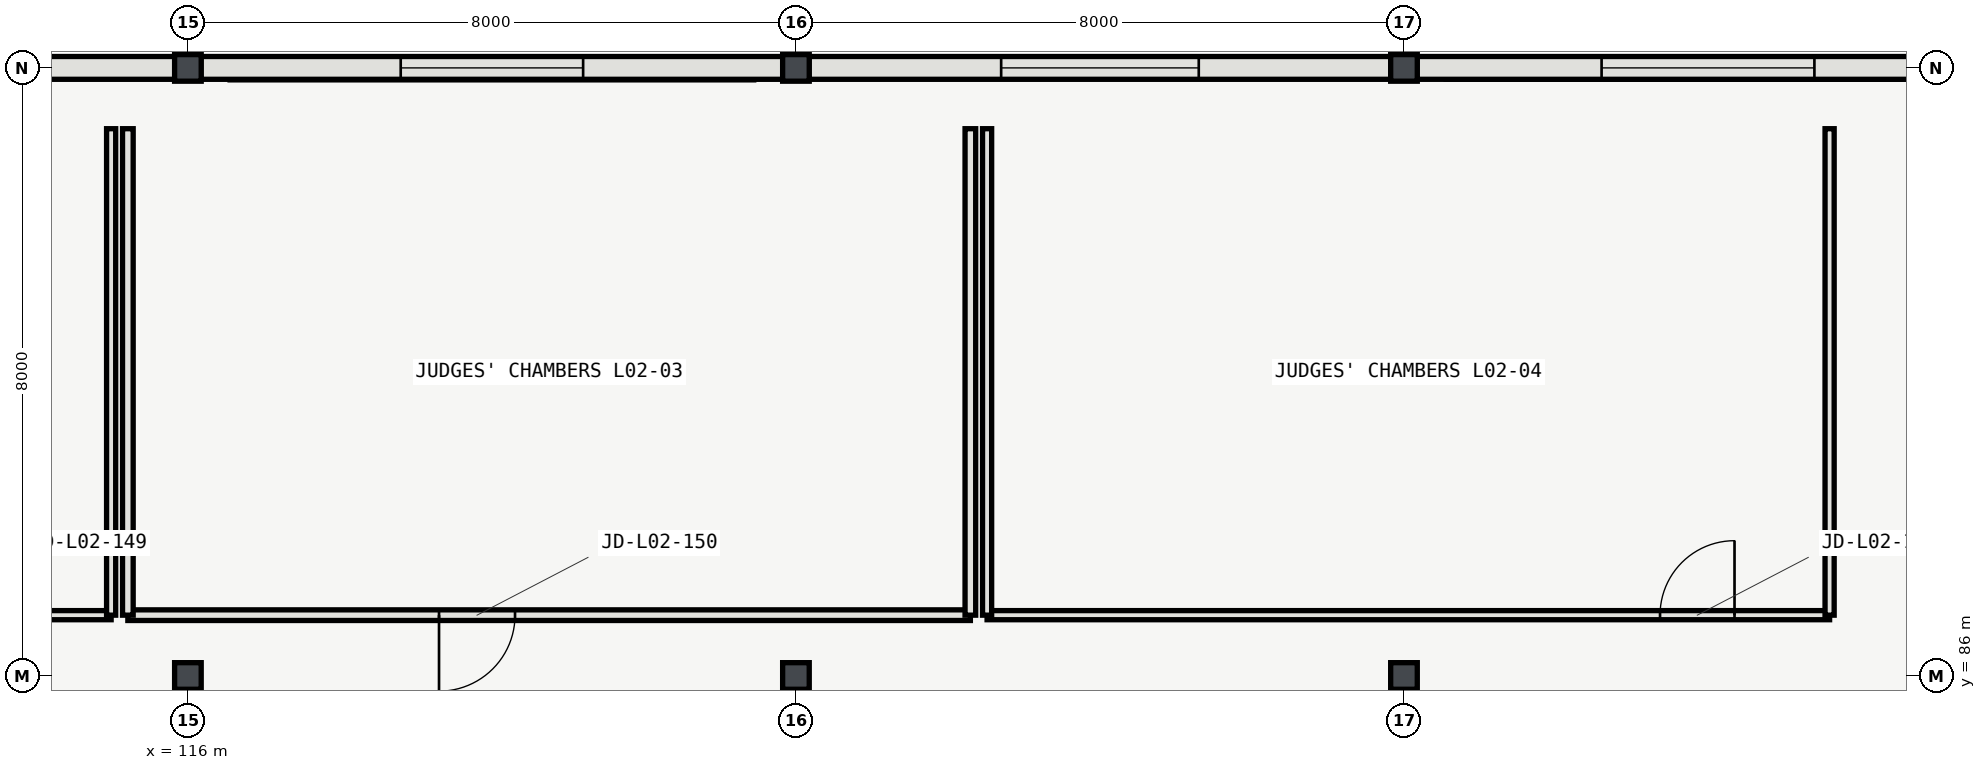
"""IFC4 building model, lengths in metres.
Left out: names, types, materials, properties, quantities, classifications, styles, units other than length and angle.
Written with IfcOpenShell. Run it as: python <this file> out.ifc"""

import sys

from ifc_helpers import new_model, si_unit, direction, frame, frame_2d, origin, origin_2d, place, context, subcontext, project, spatial, rectangle, i_section, extrude, element, fill, save


model = new_model("IFC4")
c1 = context("Model", 3, precision=1e-05, world=origin(), true_north=direction((0.0, 1.0)))
c2 = subcontext(c1, "Body", "Model", "MODEL_VIEW")
j1 = project(units=[si_unit("LENGTHUNIT", "METRE"), si_unit("PLANEANGLEUNIT", "RADIAN")], contexts=[c1])
p1 = place(None, origin())
s1 = spatial("IfcSite", under=j1, at=p1, CompositionType="ELEMENT")
p2 = place(p1, origin())
s2 = spatial("IfcBuilding", under=s1, at=p2, CompositionType="ELEMENT")
p3 = place(p2, frame((0.0, 0.0, 10.8)))
s3 = spatial("IfcBuildingStorey", under=s2, at=p3, CompositionType="ELEMENT", Elevation=10.8)
for number, where, z_axis, x_axis in (
    (1, (116.0, 86.0, 0.0), (0.0, 0.0, 1.0), (1.0, 0.0, 0.0)),
    (2, (116.0, 94.0, 0.0), (0.0, 0.0, 1.0), (1.0, 0.0, 0.0)),
    (3, (124.0, 86.0, 0.0), (0.0, 0.0, 1.0), (1.0, 0.0, 0.0)),
    (4, (124.0, 94.0, 0.0), (0.0, 0.0, 1.0), (1.0, 0.0, 0.0)),
    (5, (132.0, 86.0, 0.0), (0.0, 0.0, 1.0), (1.0, 0.0, 0.0)),
    (6, (132.0, 94.0, 0.0), (0.0, 0.0, 1.0), (1.0, 0.0, 0.0)),
):
    element("IfcColumn", number, at=place(p3, frame(where, z_axis=z_axis, x_axis=x_axis)), inside=s3, PredefinedType="COLUMN", context=c2, shape_type="SweptSolid", body=[
        extrude(i_section(OverallWidth=0.35, OverallDepth=0.35, WebThickness=0.012, FlangeThickness=0.019, FilletRadius=0.02, at=origin_2d()), origin(), (0.0, 0.0, 1.0), 5.4),
    ])
p4 = place(p3, frame((115.829, 94.0, 0.0), z_axis=(0.0, 0.0, 1.0), x_axis=(-1.0, 0.0, 0.0)))
e7 = element("IfcWall", 7, at=p4, inside=s3, PredefinedType="SOLIDWALL", context=c2, shape_type="SweptSolid", body=[
    extrude(rectangle(XDim=7.658, YDim=0.3, at=frame_2d((3.829, 0.0))), origin(), (0.0, 0.0, 1.0), 4.763),
])
p5 = place(p4, frame((2.729, 0.0, 0.95)))
e8 = element("IfcOpeningElement", 8, at=p5, cuts=e7, PredefinedType="OPENING", context=c2, shape_type="SweptSolid", body=[
    extrude(rectangle(XDim=2.2, YDim=2.1, at=frame_2d((1.1, 1.05))), frame((0.0, 0.16, 0.0), z_axis=(0.0, -1.0, 0.0), x_axis=(1.0, 0.0, 0.0)), (0.0, 0.0, 1.0), 0.32),
])
p6 = place(p3, frame((123.829, 94.0, 0.0), z_axis=(0.0, 0.0, 1.0), x_axis=(-1.0, 0.0, 0.0)))
e9 = element("IfcWall", 9, at=p6, inside=s3, PredefinedType="SOLIDWALL", context=c2, shape_type="SweptSolid", body=[
    extrude(rectangle(XDim=7.658, YDim=0.3, at=frame_2d((3.829, 0.0))), origin(), (0.0, 0.0, 1.0), 4.763),
])
p7 = place(p6, frame((2.629, 0.0, 0.95)))
e10 = element("IfcOpeningElement", 10, at=p7, cuts=e9, PredefinedType="OPENING", context=c2, shape_type="SweptSolid", body=[
    extrude(rectangle(XDim=2.4, YDim=2.1, at=frame_2d((1.2, 1.05))), frame((0.0, 0.16, 0.0), z_axis=(0.0, -1.0, 0.0), x_axis=(1.0, 0.0, 0.0)), (0.0, 0.0, 1.0), 0.32),
])
p8 = place(p3, frame((131.829, 94.0, 0.0), z_axis=(0.0, 0.0, 1.0), x_axis=(-1.0, 0.0, 0.0)))
e11 = element("IfcWall", 11, at=p8, inside=s3, PredefinedType="SOLIDWALL", context=c2, shape_type="SweptSolid", body=[
    extrude(rectangle(XDim=7.658, YDim=0.3, at=frame_2d((3.829, 0.0))), origin(), (0.0, 0.0, 1.0), 4.763),
])
p9 = place(p8, frame((2.529, 0.0, 0.95)))
e12 = element("IfcOpeningElement", 12, at=p9, cuts=e11, PredefinedType="OPENING", context=c2, shape_type="SweptSolid", body=[
    extrude(rectangle(XDim=2.6, YDim=2.1, at=frame_2d((1.3, 1.05))), frame((0.0, 0.16, 0.0), z_axis=(0.0, -1.0, 0.0), x_axis=(1.0, 0.0, 0.0)), (0.0, 0.0, 1.0), 0.32),
])
p10 = place(p3, frame((139.829, 94.0, 0.0), z_axis=(0.0, 0.0, 1.0), x_axis=(-1.0, 0.0, 0.0)))
e13 = element("IfcWall", 13, at=p10, inside=s3, PredefinedType="SOLIDWALL", context=c2, shape_type="SweptSolid", body=[
    extrude(rectangle(XDim=7.658, YDim=0.3, at=frame_2d((3.829, 0.0))), origin(), (0.0, 0.0, 1.0), 4.763),
])
p11 = place(p10, frame((2.429, 0.0, 0.95)))
e14 = element("IfcOpeningElement", 14, at=p11, cuts=e13, PredefinedType="OPENING", context=c2, shape_type="SweptSolid", body=[
    extrude(rectangle(XDim=2.8, YDim=2.1, at=frame_2d((1.4, 1.05))), frame((0.0, 0.16, 0.0), z_axis=(0.0, -1.0, 0.0), x_axis=(1.0, 0.0, 0.0)), (0.0, 0.0, 1.0), 0.32),
])
p12 = place(p3, frame((103.905, 86.8, 0.0), z_axis=(0.0, 0.0, 1.0), x_axis=(1.0, 0.0, 0.0)))
e15 = element("IfcWall", 15, at=p12, inside=s3, PredefinedType="PARTITIONING", context=c2, shape_type="SweptSolid", body=[
    extrude(rectangle(XDim=11.085, YDim=0.12, at=frame_2d((5.542, 0.0))), origin(), (0.0, 0.0, 1.0), 5.12),
])
p13 = place(p12, frame((7.904, 0.0, 0.0)))
e16 = element("IfcOpeningElement", 16, at=p13, cuts=e15, PredefinedType="OPENING", context=c2, shape_type="SweptSolid", body=[
    extrude(rectangle(XDim=0.98, YDim=2.2, at=frame_2d((0.49, 1.1))), frame((0.0, 0.07, 0.0), z_axis=(0.0, -1.0, 0.0), x_axis=(1.0, 0.0, 0.0)), (0.0, 0.0, 1.0), 0.14),
])
p14 = place(p3, frame((114.99, 86.8, 0.0), z_axis=(0.0, 0.0, 1.0), x_axis=(0.0, 1.0, 0.0)))
e17 = element("IfcWall", 17, at=p14, inside=s3, PredefinedType="PARTITIONING", context=c2, shape_type="SweptSolid", body=[
    extrude(rectangle(XDim=6.4, YDim=0.12, at=frame_2d((3.2, 0.0))), origin(), (0.0, 0.0, 1.0), 5.12),
])
p15 = place(p3, frame((115.21, 86.8, 0.0), z_axis=(0.0, 0.0, 1.0), x_axis=(1.0, 0.0, 0.0)))
e18 = element("IfcWall", 18, at=p15, inside=s3, PredefinedType="PARTITIONING", context=c2, shape_type="SweptSolid", body=[
    extrude(rectangle(XDim=11.085, YDim=0.14, at=frame_2d((5.542, 0.0))), origin(), (0.0, 0.0, 1.0), 5.12),
])
p16 = place(p15, frame((4.094, 0.0, 0.0)))
e19 = element("IfcOpeningElement", 19, at=p16, cuts=e18, PredefinedType="OPENING", context=c2, shape_type="SweptSolid", body=[
    extrude(rectangle(XDim=1.0, YDim=2.15, at=frame_2d((0.5, 1.075))), frame((0.0, 0.08, 0.0), z_axis=(0.0, -1.0, 0.0), x_axis=(1.0, 0.0, 0.0)), (0.0, 0.0, 1.0), 0.16),
])
for number, where, z_axis, x_axis in (
    (20, (115.21, 93.2, 0.0), (0.0, 0.0, 1.0), (0.0, -1.0, 0.0)),
    (21, (126.295, 86.8, 0.0), (0.0, 0.0, 1.0), (0.0, 1.0, 0.0)),
):
    element("IfcWall", number, at=place(p3, frame(where, z_axis=z_axis, x_axis=x_axis)), inside=s3, PredefinedType="PARTITIONING", context=c2, shape_type="SweptSolid", body=[
        extrude(rectangle(XDim=6.4, YDim=0.14, at=frame_2d((3.2, 0.0))), origin(), (0.0, 0.0, 1.0), 5.12),
    ])
p17 = place(p3, frame((126.515, 86.8, 0.0), z_axis=(0.0, 0.0, 1.0), x_axis=(1.0, 0.0, 0.0)))
e22 = element("IfcWall", 22, at=p17, inside=s3, PredefinedType="PARTITIONING", context=c2, shape_type="SweptSolid", body=[
    extrude(rectangle(XDim=11.085, YDim=0.12, at=frame_2d((5.542, 0.0))), origin(), (0.0, 0.0, 1.0), 5.12),
])
p18 = place(p17, frame((8.854, 0.0, 0.0)))
e23 = element("IfcOpeningElement", 23, at=p18, cuts=e22, PredefinedType="OPENING", context=c2, shape_type="SweptSolid", body=[
    extrude(rectangle(XDim=0.98, YDim=2.15, at=frame_2d((0.49, 1.075))), frame((0.0, 0.07, 0.0), z_axis=(0.0, -1.0, 0.0), x_axis=(1.0, 0.0, 0.0)), (0.0, 0.0, 1.0), 0.14),
])
for number, where, z_axis, x_axis in (
    (24, (126.515, 93.2, 0.0), (0.0, 0.0, 1.0), (0.0, -1.0, 0.0)),
    (25, (137.6, 86.8, 0.0), (0.0, 0.0, 1.0), (0.0, 1.0, 0.0)),
):
    element("IfcWall", number, at=place(p3, frame(where, z_axis=z_axis, x_axis=x_axis)), inside=s3, PredefinedType="PARTITIONING", context=c2, shape_type="SweptSolid", body=[
        extrude(rectangle(XDim=6.4, YDim=0.12, at=frame_2d((3.2, 0.0))), origin(), (0.0, 0.0, 1.0), 5.12),
    ])
p19 = place(p7, origin())
e26 = element("IfcWindow", 26, at=p19, inside=s3, PartitioningType="SINGLE_PANEL", PredefinedType="WINDOW", context=c2, shape_type="SweptSolid", body=[
    extrude(rectangle(XDim=2.4, YDim=2.1, at=frame_2d((1.2, 1.05))), frame((0.0, 0.03, 0.0), z_axis=(0.0, -1.0, 0.0), x_axis=(1.0, 0.0, 0.0)), (0.0, 0.0, 1.0), 0.06),
])
fill(e10, e26)
p20 = place(p9, origin())
e27 = element("IfcWindow", 27, at=p20, inside=s3, PartitioningType="SINGLE_PANEL", PredefinedType="WINDOW", context=c2, shape_type="SweptSolid", body=[
    extrude(rectangle(XDim=2.6, YDim=2.1, at=frame_2d((1.3, 1.05))), frame((0.0, 0.03, 0.0), z_axis=(0.0, -1.0, 0.0), x_axis=(1.0, 0.0, 0.0)), (0.0, 0.0, 1.0), 0.06),
])
fill(e12, e27)
p21 = place(p11, origin())
e28 = element("IfcWindow", 28, at=p21, inside=s3, PartitioningType="SINGLE_PANEL", PredefinedType="WINDOW", context=c2, shape_type="SweptSolid", body=[
    extrude(rectangle(XDim=2.8, YDim=2.1, at=frame_2d((1.4, 1.05))), frame((0.0, 0.03, 0.0), z_axis=(0.0, -1.0, 0.0), x_axis=(1.0, 0.0, 0.0)), (0.0, 0.0, 1.0), 0.06),
])
fill(e14, e28)
p22 = place(p16, origin())
e29 = element("IfcDoor", 29, at=p22, inside=s3, OperationType="SINGLE_SWING_LEFT", PredefinedType="DOOR", context=c2, shape_type="SweptSolid", body=[
    extrude(rectangle(XDim=1.0, YDim=2.15, at=frame_2d((0.5, 1.075))), frame((0.0, 0.025, 0.0), z_axis=(0.0, -1.0, 0.0), x_axis=(1.0, 0.0, 0.0)), (0.0, 0.0, 1.0), 0.05),
])
fill(e19, e29)
p23 = place(p18, origin())
e30 = element("IfcDoor", 30, at=p23, inside=s3, OperationType="SINGLE_SWING_RIGHT", PredefinedType="DOOR", context=c2, shape_type="SweptSolid", body=[
    extrude(rectangle(XDim=0.98, YDim=2.15, at=frame_2d((0.49, 1.075))), frame((0.0, 0.025, 0.0), z_axis=(0.0, -1.0, 0.0), x_axis=(1.0, 0.0, 0.0)), (0.0, 0.0, 1.0), 0.05),
])
fill(e23, e30)
save(model, sys.argv[1])
